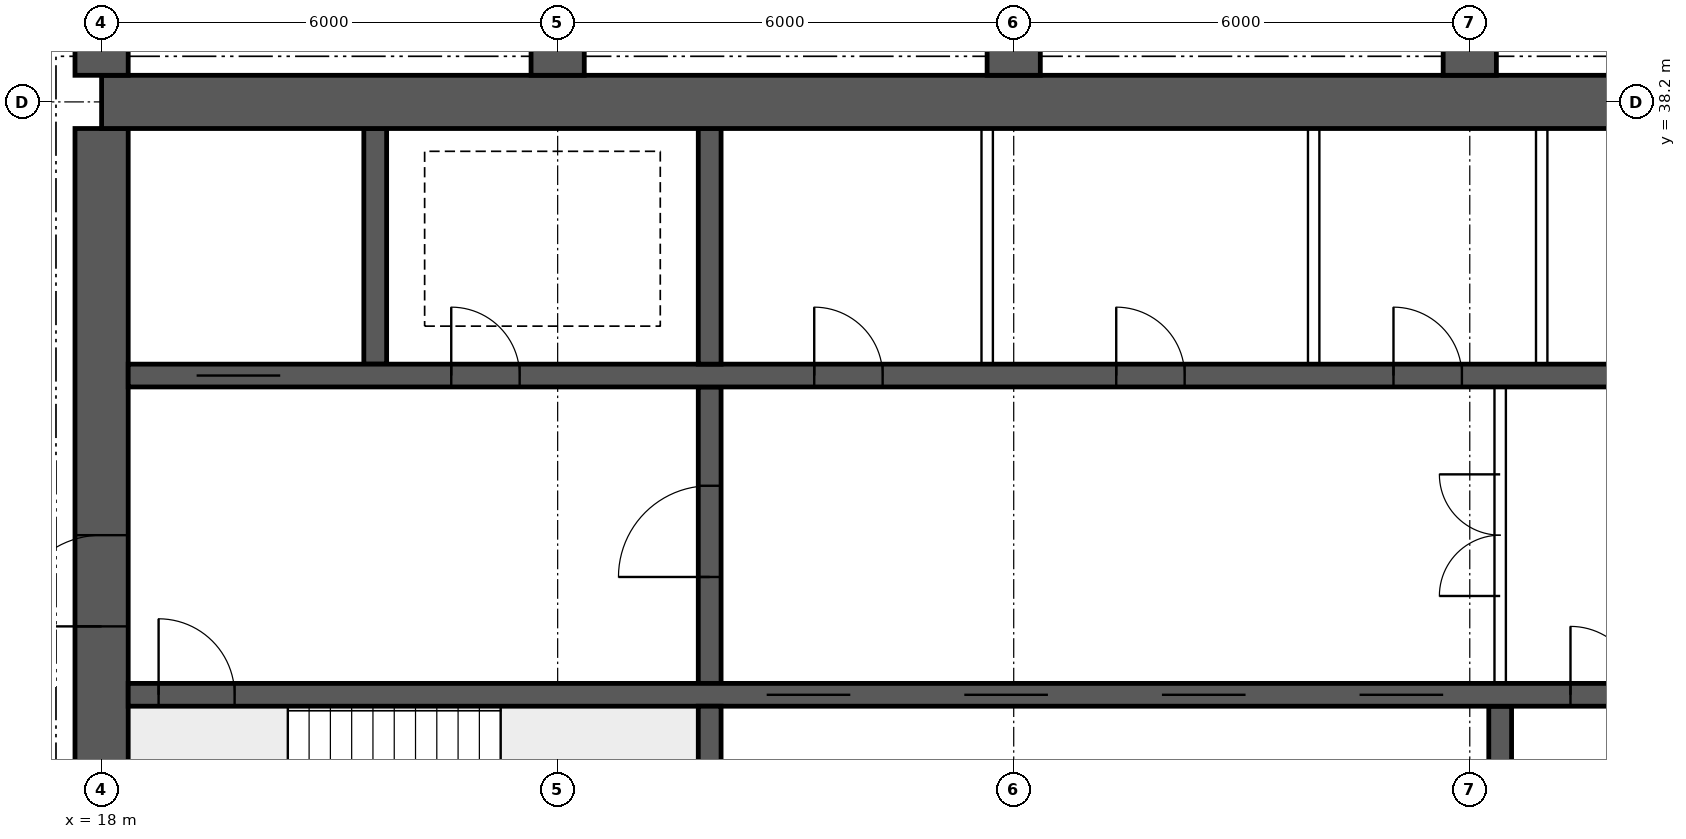
"""IFC4 building model, lengths in metres.
Left out: names, types, materials, properties, quantities, classifications, styles, units other than length and angle.
Written with IfcOpenShell. Run it as: python <this file> out.ifc"""

import sys

from ifc_helpers import new_model, si_unit, direction, frame, frame_2d, origin, place, context, subcontext, project, spatial, rectangle, extrude, element, fill, save


model = new_model("IFC4")
c1 = context("Model", 3, precision=1e-05, world=origin(), true_north=direction((0.0, 1.0)))
c2 = subcontext(c1, "Body", "Model", "MODEL_VIEW")
j1 = project(units=[si_unit("LENGTHUNIT", "METRE"), si_unit("PLANEANGLEUNIT", "RADIAN")], contexts=[c1])
p1 = place(None, origin())
s1 = spatial("IfcSite", under=j1, at=p1, CompositionType="ELEMENT")
p2 = place(p1, origin())
s2 = spatial("IfcBuilding", under=s1, at=p2, CompositionType="ELEMENT")
p3 = place(p2, frame((0.0, 0.0, 235.3)))
s3 = spatial("IfcBuildingStorey", under=s2, at=p3, CompositionType="ELEMENT", Elevation=235.3)
p4 = place(p3, frame((18.0, 38.2, 0.0), z_axis=(0.0, 0.0, 1.0), x_axis=(1.0, 0.0, 0.0)))
e1 = element("IfcWall", 1, at=p4, inside=s3, PredefinedType="SHEAR", context=c2, shape_type="SweptSolid", body=[
    extrude(rectangle(XDim=48.0, YDim=0.7, at=frame_2d((24.0, 0.0))), origin(), (0.0, 0.0, 1.0), 3.75),
])
p5 = place(p3, frame((18.0, 26.15, 0.0), z_axis=(0.0, 0.0, 1.0), x_axis=(0.0, 1.0, 0.0)))
e2 = element("IfcWall", 2, at=p5, inside=s3, PredefinedType="SHEAR", context=c2, shape_type="SweptSolid", body=[
    extrude(rectangle(XDim=11.7, YDim=0.7, at=frame_2d((5.85, 0.0))), origin(), (0.0, 0.0, 1.0), 3.75),
])
p6 = place(p5, frame((5.15, 0.0, 0.0)))
e3 = element("IfcOpeningElement", 3, at=p6, cuts=e2, PredefinedType="OPENING", context=c2, shape_type="SweptSolid", body=[
    extrude(rectangle(XDim=1.2, YDim=2.1, at=frame_2d((0.6, 1.05))), frame((0.0, 0.36, 0.0), z_axis=(0.0, -1.0, 0.0), x_axis=(1.0, 0.0, 0.0)), (0.0, 0.0, 1.0), 0.72),
])
p7 = place(p3, frame((18.35, 30.4, 0.0), z_axis=(0.0, 0.0, 1.0), x_axis=(1.0, 0.0, 0.0)))
e4 = element("IfcWall", 4, at=p7, inside=s3, PredefinedType="SHEAR", context=c2, shape_type="SweptSolid", body=[
    extrude(rectangle(XDim=47.3, YDim=0.3, at=frame_2d((23.65, 0.0))), origin(), (0.0, 0.0, 1.0), 3.75),
])
p8 = place(p7, frame((0.4, 0.0, 0.0)))
e5 = element("IfcOpeningElement", 5, at=p8, cuts=e4, PredefinedType="OPENING", context=c2, shape_type="SweptSolid", body=[
    extrude(rectangle(XDim=1.0, YDim=2.1, at=frame_2d((0.5, 1.05))), frame((0.0, 0.16, 0.0), z_axis=(0.0, -1.0, 0.0), x_axis=(1.0, 0.0, 0.0)), (0.0, 0.0, 1.0), 0.32),
])
p9 = place(p7, frame((45.9, 0.0, 0.0)))
e6 = element("IfcOpeningElement", 6, at=p9, cuts=e4, PredefinedType="OPENING", context=c2, shape_type="SweptSolid", body=[
    extrude(rectangle(XDim=1.0, YDim=2.1, at=frame_2d((0.5, 1.05))), frame((0.0, 0.16, 0.0), z_axis=(0.0, -1.0, 0.0), x_axis=(1.0, 0.0, 0.0)), (0.0, 0.0, 1.0), 0.32),
])
p10 = place(p7, frame((8.4, 0.0, 0.0)))
e7 = element("IfcOpeningElement", 7, at=p10, cuts=e4, PredefinedType="OPENING", context=c2, shape_type="SweptSolid", body=[
    extrude(rectangle(XDim=1.1, YDim=2.1, at=frame_2d((0.55, 1.05))), frame((0.0, 0.16, 0.0), z_axis=(0.0, -1.0, 0.0), x_axis=(1.0, 0.0, 0.0)), (0.0, 0.0, 1.0), 0.32),
])
p11 = place(p7, frame((11.0, 0.0, 0.0)))
e8 = element("IfcOpeningElement", 8, at=p11, cuts=e4, PredefinedType="OPENING", context=c2, shape_type="SweptSolid", body=[
    extrude(rectangle(XDim=1.1, YDim=2.1, at=frame_2d((0.55, 1.05))), frame((0.0, 0.16, 0.0), z_axis=(0.0, -1.0, 0.0), x_axis=(1.0, 0.0, 0.0)), (0.0, 0.0, 1.0), 0.32),
])
p12 = place(p7, frame((13.6, 0.0, 0.0)))
e9 = element("IfcOpeningElement", 9, at=p12, cuts=e4, PredefinedType="OPENING", context=c2, shape_type="SweptSolid", body=[
    extrude(rectangle(XDim=1.1, YDim=2.1, at=frame_2d((0.55, 1.05))), frame((0.0, 0.16, 0.0), z_axis=(0.0, -1.0, 0.0), x_axis=(1.0, 0.0, 0.0)), (0.0, 0.0, 1.0), 0.32),
])
p13 = place(p7, frame((16.2, 0.0, 0.0)))
e10 = element("IfcOpeningElement", 10, at=p13, cuts=e4, PredefinedType="OPENING", context=c2, shape_type="SweptSolid", body=[
    extrude(rectangle(XDim=1.1, YDim=2.1, at=frame_2d((0.55, 1.05))), frame((0.0, 0.16, 0.0), z_axis=(0.0, -1.0, 0.0), x_axis=(1.0, 0.0, 0.0)), (0.0, 0.0, 1.0), 0.32),
])
p14 = place(p7, frame((18.975, 0.0, 0.0)))
e11 = element("IfcOpeningElement", 11, at=p14, cuts=e4, PredefinedType="OPENING", context=c2, shape_type="SweptSolid", body=[
    extrude(rectangle(XDim=0.9, YDim=2.1, at=frame_2d((0.45, 1.05))), frame((0.0, 0.16, 0.0), z_axis=(0.0, -1.0, 0.0), x_axis=(1.0, 0.0, 0.0)), (0.0, 0.0, 1.0), 0.32),
])
p15 = place(p7, frame((24.475, 0.0, 0.0)))
e12 = element("IfcOpeningElement", 12, at=p15, cuts=e4, PredefinedType="OPENING", context=c2, shape_type="SweptSolid", body=[
    extrude(rectangle(XDim=0.9, YDim=2.1, at=frame_2d((0.45, 1.05))), frame((0.0, 0.16, 0.0), z_axis=(0.0, -1.0, 0.0), x_axis=(1.0, 0.0, 0.0)), (0.0, 0.0, 1.0), 0.32),
])
p16 = place(p7, frame((30.267, 0.0, 0.0)))
e13 = element("IfcOpeningElement", 13, at=p16, cuts=e4, PredefinedType="OPENING", context=c2, shape_type="SweptSolid", body=[
    extrude(rectangle(XDim=1.1, YDim=2.1, at=frame_2d((0.55, 1.05))), frame((0.0, 0.16, 0.0), z_axis=(0.0, -1.0, 0.0), x_axis=(1.0, 0.0, 0.0)), (0.0, 0.0, 1.0), 0.32),
])
p17 = place(p7, frame((33.8, 0.0, 0.0)))
e14 = element("IfcOpeningElement", 14, at=p17, cuts=e4, PredefinedType="OPENING", context=c2, shape_type="SweptSolid", body=[
    extrude(rectangle(XDim=1.1, YDim=2.1, at=frame_2d((0.55, 1.05))), frame((0.0, 0.16, 0.0), z_axis=(0.0, -1.0, 0.0), x_axis=(1.0, 0.0, 0.0)), (0.0, 0.0, 1.0), 0.32),
])
p18 = place(p7, frame((37.333, 0.0, 0.0)))
e15 = element("IfcOpeningElement", 15, at=p18, cuts=e4, PredefinedType="OPENING", context=c2, shape_type="SweptSolid", body=[
    extrude(rectangle(XDim=1.1, YDim=2.1, at=frame_2d((0.55, 1.05))), frame((0.0, 0.16, 0.0), z_axis=(0.0, -1.0, 0.0), x_axis=(1.0, 0.0, 0.0)), (0.0, 0.0, 1.0), 0.32),
])
p19 = place(p3, frame((18.35, 34.6, 0.0), z_axis=(0.0, 0.0, 1.0), x_axis=(1.0, 0.0, 0.0)))
e16 = element("IfcWall", 16, at=p19, inside=s3, PredefinedType="SHEAR", context=c2, shape_type="SweptSolid", body=[
    extrude(rectangle(XDim=47.3, YDim=0.3, at=frame_2d((23.65, 0.0))), origin(), (0.0, 0.0, 1.0), 3.75),
])
p20 = place(p19, frame((0.9, 0.0, 0.0)))
e17 = element("IfcOpeningElement", 17, at=p20, cuts=e16, PredefinedType="OPENING", context=c2, shape_type="SweptSolid", body=[
    extrude(rectangle(XDim=1.1, YDim=2.1, at=frame_2d((0.55, 1.05))), frame((0.0, 0.16, 0.0), z_axis=(0.0, -1.0, 0.0), x_axis=(1.0, 0.0, 0.0)), (0.0, 0.0, 1.0), 0.32),
])
p21 = place(p19, frame((45.3, 0.0, 0.0)))
e18 = element("IfcOpeningElement", 18, at=p21, cuts=e16, PredefinedType="OPENING", context=c2, shape_type="SweptSolid", body=[
    extrude(rectangle(XDim=1.1, YDim=2.1, at=frame_2d((0.55, 1.05))), frame((0.0, 0.16, 0.0), z_axis=(0.0, -1.0, 0.0), x_axis=(1.0, 0.0, 0.0)), (0.0, 0.0, 1.0), 0.32),
])
p22 = place(p19, frame((4.25, 0.0, 0.0)))
e19 = element("IfcOpeningElement", 19, at=p22, cuts=e16, PredefinedType="OPENING", context=c2, shape_type="SweptSolid", body=[
    extrude(rectangle(XDim=0.9, YDim=2.1, at=frame_2d((0.45, 1.05))), frame((0.0, 0.16, 0.0), z_axis=(0.0, -1.0, 0.0), x_axis=(1.0, 0.0, 0.0)), (0.0, 0.0, 1.0), 0.32),
])
p23 = place(p19, frame((42.15, 0.0, 0.0)))
e20 = element("IfcOpeningElement", 20, at=p23, cuts=e16, PredefinedType="OPENING", context=c2, shape_type="SweptSolid", body=[
    extrude(rectangle(XDim=0.9, YDim=2.1, at=frame_2d((0.45, 1.05))), frame((0.0, 0.16, 0.0), z_axis=(0.0, -1.0, 0.0), x_axis=(1.0, 0.0, 0.0)), (0.0, 0.0, 1.0), 0.32),
])
p24 = place(p19, frame((9.025, 0.0, 0.0)))
e21 = element("IfcOpeningElement", 21, at=p24, cuts=e16, PredefinedType="OPENING", context=c2, shape_type="SweptSolid", body=[
    extrude(rectangle(XDim=0.9, YDim=2.1, at=frame_2d((0.45, 1.05))), frame((0.0, 0.16, 0.0), z_axis=(0.0, -1.0, 0.0), x_axis=(1.0, 0.0, 0.0)), (0.0, 0.0, 1.0), 0.32),
])
p25 = place(p19, frame((12.999, 0.0, 0.0)))
e22 = element("IfcOpeningElement", 22, at=p25, cuts=e16, PredefinedType="OPENING", context=c2, shape_type="SweptSolid", body=[
    extrude(rectangle(XDim=0.9, YDim=2.1, at=frame_2d((0.45, 1.05))), frame((0.0, 0.16, 0.0), z_axis=(0.0, -1.0, 0.0), x_axis=(1.0, 0.0, 0.0)), (0.0, 0.0, 1.0), 0.32),
])
p26 = place(p19, frame((16.646, 0.0, 0.0)))
e23 = element("IfcOpeningElement", 23, at=p26, cuts=e16, PredefinedType="OPENING", context=c2, shape_type="SweptSolid", body=[
    extrude(rectangle(XDim=0.9, YDim=2.1, at=frame_2d((0.45, 1.05))), frame((0.0, 0.16, 0.0), z_axis=(0.0, -1.0, 0.0), x_axis=(1.0, 0.0, 0.0)), (0.0, 0.0, 1.0), 0.32),
])
p27 = place(p19, frame((20.405, 0.0, 0.0)))
e24 = element("IfcOpeningElement", 24, at=p27, cuts=e16, PredefinedType="OPENING", context=c2, shape_type="SweptSolid", body=[
    extrude(rectangle(XDim=0.9, YDim=2.1, at=frame_2d((0.45, 1.05))), frame((0.0, 0.16, 0.0), z_axis=(0.0, -1.0, 0.0), x_axis=(1.0, 0.0, 0.0)), (0.0, 0.0, 1.0), 0.32),
])
p28 = place(p19, frame((24.811, 0.0, 0.0)))
e25 = element("IfcOpeningElement", 25, at=p28, cuts=e16, PredefinedType="OPENING", context=c2, shape_type="SweptSolid", body=[
    extrude(rectangle(XDim=0.9, YDim=2.1, at=frame_2d((0.45, 1.05))), frame((0.0, 0.16, 0.0), z_axis=(0.0, -1.0, 0.0), x_axis=(1.0, 0.0, 0.0)), (0.0, 0.0, 1.0), 0.32),
])
p29 = place(p19, frame((27.608, 0.0, 0.0)))
e26 = element("IfcOpeningElement", 26, at=p29, cuts=e16, PredefinedType="OPENING", context=c2, shape_type="SweptSolid", body=[
    extrude(rectangle(XDim=0.9, YDim=2.1, at=frame_2d((0.45, 1.05))), frame((0.0, 0.16, 0.0), z_axis=(0.0, -1.0, 0.0), x_axis=(1.0, 0.0, 0.0)), (0.0, 0.0, 1.0), 0.32),
])
p30 = place(p19, frame((30.791, 0.0, 0.0)))
e27 = element("IfcOpeningElement", 27, at=p30, cuts=e16, PredefinedType="OPENING", context=c2, shape_type="SweptSolid", body=[
    extrude(rectangle(XDim=0.9, YDim=2.1, at=frame_2d((0.45, 1.05))), frame((0.0, 0.16, 0.0), z_axis=(0.0, -1.0, 0.0), x_axis=(1.0, 0.0, 0.0)), (0.0, 0.0, 1.0), 0.32),
])
p31 = place(p19, frame((34.742, 0.0, 0.0)))
e28 = element("IfcOpeningElement", 28, at=p31, cuts=e16, PredefinedType="OPENING", context=c2, shape_type="SweptSolid", body=[
    extrude(rectangle(XDim=0.9, YDim=2.1, at=frame_2d((0.45, 1.05))), frame((0.0, 0.16, 0.0), z_axis=(0.0, -1.0, 0.0), x_axis=(1.0, 0.0, 0.0)), (0.0, 0.0, 1.0), 0.32),
])
p32 = place(p19, frame((37.68, 0.0, 0.0)))
e29 = element("IfcOpeningElement", 29, at=p32, cuts=e16, PredefinedType="OPENING", context=c2, shape_type="SweptSolid", body=[
    extrude(rectangle(XDim=0.9, YDim=2.1, at=frame_2d((0.45, 1.05))), frame((0.0, 0.16, 0.0), z_axis=(0.0, -1.0, 0.0), x_axis=(1.0, 0.0, 0.0)), (0.0, 0.0, 1.0), 0.32),
])
p33 = place(p3, frame((26.0, 26.15, 0.0), z_axis=(0.0, 0.0, 1.0), x_axis=(0.0, 1.0, 0.0)))
e30 = element("IfcWall", 30, at=p33, inside=s3, PredefinedType="SHEAR", context=c2, shape_type="SweptSolid", body=[
    extrude(rectangle(XDim=4.1, YDim=0.3, at=frame_2d((2.05, 0.0))), origin(), (0.0, 0.0, 1.0), 3.75),
])
p34 = place(p3, frame((26.0, 30.55, 0.0), z_axis=(0.0, 0.0, 1.0), x_axis=(0.0, 1.0, 0.0)))
e31 = element("IfcWall", 31, at=p34, inside=s3, PredefinedType="SHEAR", context=c2, shape_type="SweptSolid", body=[
    extrude(rectangle(XDim=3.9, YDim=0.3, at=frame_2d((1.95, 0.0))), origin(), (0.0, 0.0, 1.0), 3.75),
])
p35 = place(p34, frame((1.4, 0.0, 0.0)))
e32 = element("IfcOpeningElement", 32, at=p35, cuts=e31, PredefinedType="OPENING", context=c2, shape_type="SweptSolid", body=[
    extrude(rectangle(XDim=1.2, YDim=2.1, at=frame_2d((0.6, 1.05))), frame((0.0, 0.16, 0.0), z_axis=(0.0, -1.0, 0.0), x_axis=(1.0, 0.0, 0.0)), (0.0, 0.0, 1.0), 0.32),
])
for number, where, z_axis, x_axis in (
    (33, (21.6, 34.75, 0.0), (0.0, 0.0, 1.0), (0.0, 1.0, 0.0)),
    (34, (26.0, 34.75, 0.0), (0.0, 0.0, 1.0), (0.0, 1.0, 0.0)),
):
    element("IfcWall", number, at=place(p3, frame(where, z_axis=z_axis, x_axis=x_axis)), inside=s3, PredefinedType="SHEAR", context=c2, shape_type="SweptSolid", body=[
        extrude(rectangle(XDim=3.1, YDim=0.3, at=frame_2d((1.55, 0.0))), origin(), (0.0, 0.0, 1.0), 3.75),
    ])
p36 = place(p3, frame((36.4, 26.15, 0.0), z_axis=(0.0, 0.0, 1.0), x_axis=(0.0, 1.0, 0.0)))
e35 = element("IfcWall", 35, at=p36, inside=s3, PredefinedType="SHEAR", context=c2, shape_type="SweptSolid", body=[
    extrude(rectangle(XDim=4.1, YDim=0.3, at=frame_2d((2.05, 0.0))), origin(), (0.0, 0.0, 1.0), 3.75),
])
for number, where, z_axis, x_axis in (
    (36, (18.0, 38.55, 0.0), (0.0, 0.0, 1.0), (0.0, 1.0, 0.0)),
    (37, (24.0, 38.55, 0.0), (0.0, 0.0, 1.0), (0.0, 1.0, 0.0)),
    (38, (30.0, 38.55, 0.0), (0.0, 0.0, 1.0), (0.0, 1.0, 0.0)),
    (39, (36.0, 38.55, 0.0), (0.0, 0.0, 1.0), (0.0, 1.0, 0.0)),
):
    element("IfcWall", number, at=place(p3, frame(where, z_axis=z_axis, x_axis=x_axis)), inside=s3, PredefinedType="SHEAR", context=c2, shape_type="SweptSolid", body=[
        extrude(rectangle(XDim=7.05, YDim=0.7, at=frame_2d((3.525, 0.0))), origin(), (0.0, 0.0, 1.0), 3.75),
    ])
p37 = place(p3, frame((36.4, 30.55, 0.0), z_axis=(0.0, 0.0, 1.0), x_axis=(0.0, 1.0, 0.0)))
e40 = element("IfcWall", 40, at=p37, inside=s3, PredefinedType="SOLIDWALL", context=c2, shape_type="SweptSolid", body=[
    extrude(rectangle(XDim=3.9, YDim=0.15, at=frame_2d((1.95, 0.0))), origin(), (0.0, 0.0, 1.0), 3.5),
])
p38 = place(p37, frame((1.15, 0.0, 0.0)))
e41 = element("IfcOpeningElement", 41, at=p38, cuts=e40, PredefinedType="OPENING", context=c2, shape_type="SweptSolid", body=[
    extrude(rectangle(XDim=1.6, YDim=2.1, at=frame_2d((0.8, 1.05))), frame((0.0, 0.085, 0.0), z_axis=(0.0, -1.0, 0.0), x_axis=(1.0, 0.0, 0.0)), (0.0, 0.0, 1.0), 0.17),
])
for number, where, z_axis, x_axis in (
    (42, (29.651, 34.75, 0.0), (0.0, 0.0, 1.0), (0.0, 1.0, 0.0)),
    (43, (33.946, 34.75, 0.0), (0.0, 0.0, 1.0), (0.0, 1.0, 0.0)),
    (44, (36.946, 34.75, 0.0), (0.0, 0.0, 1.0), (0.0, 1.0, 0.0)),
):
    element("IfcWall", number, at=place(p3, frame(where, z_axis=z_axis, x_axis=x_axis)), inside=s3, PredefinedType="SOLIDWALL", context=c2, shape_type="SweptSolid", body=[
        extrude(rectangle(XDim=3.1, YDim=0.15, at=frame_2d((1.55, 0.0))), origin(), (0.0, 0.0, 1.0), 3.5),
    ])
p39 = place(p38, origin())
e45 = element("IfcDoor", 45, at=p39, inside=s3, OperationType="DOUBLE_DOOR_SINGLE_SWING", PredefinedType="DOOR", context=c2, shape_type="SweptSolid", body=[
    extrude(rectangle(XDim=1.6, YDim=2.1, at=frame_2d((0.8, 1.05))), frame((0.0, 0.025, 0.0), z_axis=(0.0, -1.0, 0.0), x_axis=(1.0, 0.0, 0.0)), (0.0, 0.0, 1.0), 0.05),
])
fill(e41, e45)
p40 = place(p6, origin())
e46 = element("IfcDoor", 46, at=p40, inside=s3, OperationType="SINGLE_SWING_LEFT", PredefinedType="DOOR", context=c2, shape_type="SweptSolid", body=[
    extrude(rectangle(XDim=1.2, YDim=2.1, at=frame_2d((0.6, 1.05))), frame((0.0, 0.025, 0.0), z_axis=(0.0, -1.0, 0.0), x_axis=(1.0, 0.0, 0.0)), (0.0, 0.0, 1.0), 0.05),
])
fill(e3, e46)
p41 = place(p8, origin())
e47 = element("IfcDoor", 47, at=p41, inside=s3, OperationType="SINGLE_SWING_LEFT", PredefinedType="DOOR", context=c2, shape_type="SweptSolid", body=[
    extrude(rectangle(XDim=1.0, YDim=2.1, at=frame_2d((0.5, 1.05))), frame((0.0, 0.025, 0.0), z_axis=(0.0, -1.0, 0.0), x_axis=(1.0, 0.0, 0.0)), (0.0, 0.0, 1.0), 0.05),
])
fill(e5, e47)
p42 = place(p20, origin())
e48 = element("IfcDoor", 48, at=p42, inside=s3, OperationType="DOUBLE_DOOR_SLIDING", PredefinedType="DOOR", context=c2, shape_type="SweptSolid", body=[
    extrude(rectangle(XDim=1.1, YDim=2.1, at=frame_2d((0.55, 1.05))), frame((0.0, 0.025, 0.0), z_axis=(0.0, -1.0, 0.0), x_axis=(1.0, 0.0, 0.0)), (0.0, 0.0, 1.0), 0.05),
])
fill(e17, e48)
p43 = place(p22, origin())
e49 = element("IfcDoor", 49, at=p43, inside=s3, OperationType="SINGLE_SWING_LEFT", PredefinedType="DOOR", context=c2, shape_type="SweptSolid", body=[
    extrude(rectangle(XDim=0.9, YDim=2.1, at=frame_2d((0.45, 1.05))), frame((0.0, 0.025, 0.0), z_axis=(0.0, -1.0, 0.0), x_axis=(1.0, 0.0, 0.0)), (0.0, 0.0, 1.0), 0.05),
])
fill(e19, e49)
p44 = place(p35, origin())
e50 = element("IfcDoor", 50, at=p44, inside=s3, OperationType="SINGLE_SWING_LEFT", PredefinedType="DOOR", context=c2, shape_type="SweptSolid", body=[
    extrude(rectangle(XDim=1.2, YDim=2.1, at=frame_2d((0.6, 1.05))), frame((0.0, 0.025, 0.0), z_axis=(0.0, -1.0, 0.0), x_axis=(1.0, 0.0, 0.0)), (0.0, 0.0, 1.0), 0.05),
])
fill(e32, e50)
p45 = place(p24, origin())
e51 = element("IfcDoor", 51, at=p45, inside=s3, OperationType="SINGLE_SWING_LEFT", PredefinedType="DOOR", context=c2, shape_type="SweptSolid", body=[
    extrude(rectangle(XDim=0.9, YDim=2.1, at=frame_2d((0.45, 1.05))), frame((0.0, 0.025, 0.0), z_axis=(0.0, -1.0, 0.0), x_axis=(1.0, 0.0, 0.0)), (0.0, 0.0, 1.0), 0.05),
])
fill(e21, e51)
p46 = place(p25, origin())
e52 = element("IfcDoor", 52, at=p46, inside=s3, OperationType="SINGLE_SWING_LEFT", PredefinedType="DOOR", context=c2, shape_type="SweptSolid", body=[
    extrude(rectangle(XDim=0.9, YDim=2.1, at=frame_2d((0.45, 1.05))), frame((0.0, 0.025, 0.0), z_axis=(0.0, -1.0, 0.0), x_axis=(1.0, 0.0, 0.0)), (0.0, 0.0, 1.0), 0.05),
])
fill(e22, e52)
p47 = place(p26, origin())
e53 = element("IfcDoor", 53, at=p47, inside=s3, OperationType="SINGLE_SWING_LEFT", PredefinedType="DOOR", context=c2, shape_type="SweptSolid", body=[
    extrude(rectangle(XDim=0.9, YDim=2.1, at=frame_2d((0.45, 1.05))), frame((0.0, 0.025, 0.0), z_axis=(0.0, -1.0, 0.0), x_axis=(1.0, 0.0, 0.0)), (0.0, 0.0, 1.0), 0.05),
])
fill(e23, e53)
p48 = place(p10, origin())
e54 = element("IfcDoor", 54, at=p48, inside=s3, OperationType="DOUBLE_DOOR_SLIDING", PredefinedType="DOOR", context=c2, shape_type="SweptSolid", body=[
    extrude(rectangle(XDim=1.1, YDim=2.1, at=frame_2d((0.55, 1.05))), frame((0.0, 0.025, 0.0), z_axis=(0.0, -1.0, 0.0), x_axis=(1.0, 0.0, 0.0)), (0.0, 0.0, 1.0), 0.05),
])
fill(e7, e54)
p49 = place(p11, origin())
e55 = element("IfcDoor", 55, at=p49, inside=s3, OperationType="DOUBLE_DOOR_SLIDING", PredefinedType="DOOR", context=c2, shape_type="SweptSolid", body=[
    extrude(rectangle(XDim=1.1, YDim=2.1, at=frame_2d((0.55, 1.05))), frame((0.0, 0.025, 0.0), z_axis=(0.0, -1.0, 0.0), x_axis=(1.0, 0.0, 0.0)), (0.0, 0.0, 1.0), 0.05),
])
fill(e8, e55)
p50 = place(p12, origin())
e56 = element("IfcDoor", 56, at=p50, inside=s3, OperationType="DOUBLE_DOOR_SLIDING", PredefinedType="DOOR", context=c2, shape_type="SweptSolid", body=[
    extrude(rectangle(XDim=1.1, YDim=2.1, at=frame_2d((0.55, 1.05))), frame((0.0, 0.025, 0.0), z_axis=(0.0, -1.0, 0.0), x_axis=(1.0, 0.0, 0.0)), (0.0, 0.0, 1.0), 0.05),
])
fill(e9, e56)
p51 = place(p13, origin())
e57 = element("IfcDoor", 57, at=p51, inside=s3, OperationType="DOUBLE_DOOR_SLIDING", PredefinedType="DOOR", context=c2, shape_type="SweptSolid", body=[
    extrude(rectangle(XDim=1.1, YDim=2.1, at=frame_2d((0.55, 1.05))), frame((0.0, 0.025, 0.0), z_axis=(0.0, -1.0, 0.0), x_axis=(1.0, 0.0, 0.0)), (0.0, 0.0, 1.0), 0.05),
])
fill(e10, e57)
p52 = place(p14, origin())
e58 = element("IfcDoor", 58, at=p52, inside=s3, OperationType="SINGLE_SWING_LEFT", PredefinedType="DOOR", context=c2, shape_type="SweptSolid", body=[
    extrude(rectangle(XDim=0.9, YDim=2.1, at=frame_2d((0.45, 1.05))), frame((0.0, 0.025, 0.0), z_axis=(0.0, -1.0, 0.0), x_axis=(1.0, 0.0, 0.0)), (0.0, 0.0, 1.0), 0.05),
])
fill(e11, e58)
save(model, sys.argv[1])
